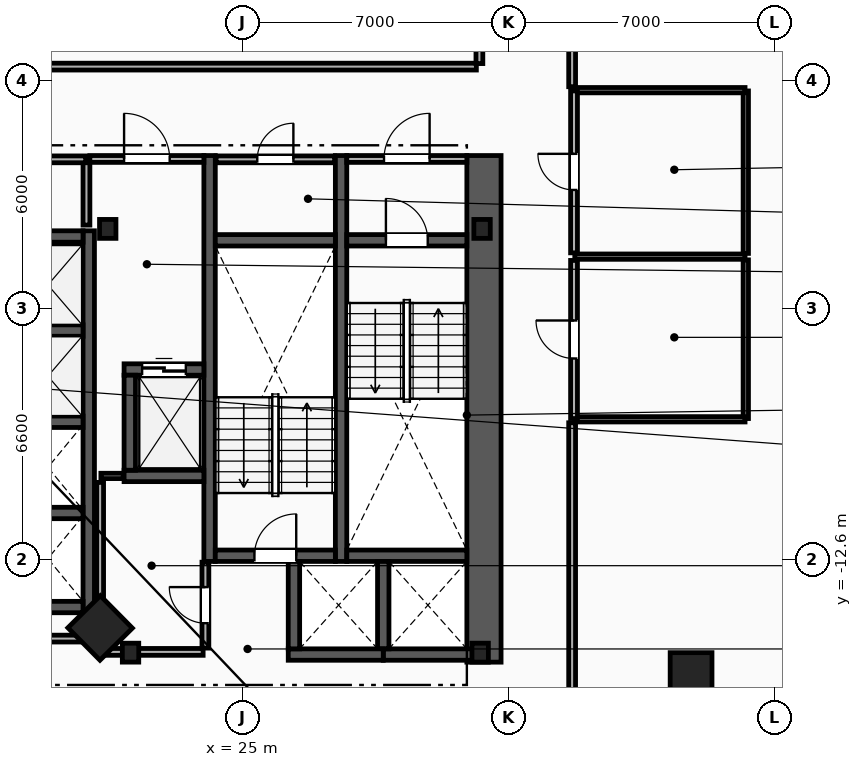
"""IFC4 building model, lengths in metres.
Left out: names, types, materials, properties, quantities, classifications, styles, units other than length and angle.
Written with IfcOpenShell. Run it as: python <this file> out.ifc"""

import sys

from ifc_helpers import new_model, si_unit, direction, frame, frame_2d, origin, origin_2d, place, context, subcontext, project, spatial, rectangle, i_section, extrude, element, fill, save


model = new_model("IFC4")
c1 = context("Model", 3, precision=1e-05, world=origin(), true_north=direction((0.0, 1.0)))
c2 = subcontext(c1, "Body", "Model", "MODEL_VIEW")
j1 = project(units=[si_unit("LENGTHUNIT", "METRE"), si_unit("PLANEANGLEUNIT", "RADIAN")], contexts=[c1])
p1 = place(None, origin())
s1 = spatial("IfcSite", under=j1, at=p1, CompositionType="ELEMENT")
p2 = place(p1, origin())
s2 = spatial("IfcBuilding", under=s1, at=p2, CompositionType="ELEMENT")
p3 = place(p2, frame((0.0, 0.0, 73.4)))
s3 = spatial("IfcBuildingStorey", under=s2, at=p3, CompositionType="ELEMENT", Elevation=73.4)
for number, where, z_axis, x_axis in (
    (1, (31.3, -3.9, 0.0), (0.0, 0.0, 1.0), (1.0, 0.0, 0.0)),
    (2, (21.45, -3.9, 0.0), (0.0, 0.0, 1.0), (1.0, 0.0, 0.0)),
    (3, (22.05, -15.05, 0.0), (0.0, 0.0, 1.0), (1.0, 0.0, 0.0)),
    (4, (31.25, -15.05, 0.0), (0.0, 0.0, 1.0), (1.0, 0.0, 0.0)),
):
    element("IfcColumn", number, at=place(p3, frame(where, z_axis=z_axis, x_axis=x_axis)), inside=s3, PredefinedType="COLUMN", context=c2, shape_type="SweptSolid", body=[
        extrude(i_section(OverallWidth=0.432, OverallDepth=0.498, WebThickness=0.056, FlangeThickness=0.089, FilletRadius=0.018, at=origin_2d()), origin(), (0.0, 0.0, 1.0), 3.8),
    ])
p4 = place(p3, frame((36.8, -15.6, 0.0), z_axis=(0.0, 0.0, 1.0), x_axis=(1.0, 0.0, 0.0)))
e5 = element("IfcColumn", 5, at=p4, inside=s3, PredefinedType="COLUMN", context=c2, shape_type="SweptSolid", body=[
    extrude(rectangle(XDim=1.1, YDim=1.1, at=origin_2d()), origin(), (0.0, 0.0, 1.0), 3.8),
])
p5 = place(p3, frame((21.25, -14.4, 0.0), z_axis=(0.0, 0.0, 1.0), x_axis=(0.703270634186, -0.710922228581, 0.0)))
e6 = element("IfcColumn", 6, at=p5, inside=s3, PredefinedType="COLUMN", context=c2, shape_type="SweptSolid", body=[
    extrude(rectangle(XDim=1.2, YDim=1.2, at=origin_2d()), origin(), (0.0, 0.0, 1.0), 3.8),
])
p6 = place(p3, frame((31.35, -15.3, 0.0), z_axis=(0.0, 0.0, 1.0), x_axis=(0.0, 1.0, 0.0)))
e7 = element("IfcWall", 7, at=p6, inside=s3, PredefinedType="SHEAR", context=c2, shape_type="SweptSolid", body=[
    extrude(rectangle(XDim=13.33, YDim=0.9, at=frame_2d((6.665, 0.0))), origin(), (0.0, 0.0, 1.0), 3.52),
])
for number, where, z_axis, x_axis in (
    (8, (27.59, -12.65, 0.0), (0.0, 0.0, 1.0), (0.0, 1.0, 0.0)),
    (9, (24.13, -12.65, 0.0), (0.0, 0.0, 1.0), (0.0, 1.0, 0.0)),
):
    element("IfcWall", number, at=place(p3, frame(where, z_axis=z_axis, x_axis=x_axis)), inside=s3, PredefinedType="SHEAR", context=c2, shape_type="SweptSolid", body=[
        extrude(rectangle(XDim=10.68, YDim=0.3, at=frame_2d((5.34, 0.0))), origin(), (0.0, 0.0, 1.0), 3.52),
    ])
p7 = place(p3, frame((27.74, -4.2, 0.0), z_axis=(0.0, 0.0, 1.0), x_axis=(1.0, 0.0, 0.0)))
e10 = element("IfcWall", 10, at=p7, inside=s3, PredefinedType="SHEAR", context=c2, shape_type="SweptSolid", body=[
    extrude(rectangle(XDim=3.16, YDim=0.3, at=frame_2d((1.58, 0.0))), origin(), (0.0, 0.0, 1.0), 3.52),
])
p8 = place(p7, frame((1.03, 0.0, 0.0)))
e11 = element("IfcOpeningElement", 11, at=p8, cuts=e10, PredefinedType="OPENING", context=c2, shape_type="SweptSolid", body=[
    extrude(rectangle(XDim=1.1, YDim=2.15, at=frame_2d((0.55, 1.075))), frame((0.0, 0.16, 0.0), z_axis=(0.0, -1.0, 0.0), x_axis=(1.0, 0.0, 0.0)), (0.0, 0.0, 1.0), 0.32),
])
p9 = place(p3, frame((27.74, -12.5, 0.0), z_axis=(0.0, 0.0, 1.0), x_axis=(1.0, 0.0, 0.0)))
e12 = element("IfcWall", 12, at=p9, inside=s3, PredefinedType="SHEAR", context=c2, shape_type="SweptSolid", body=[
    extrude(rectangle(XDim=3.16, YDim=0.3, at=frame_2d((1.58, 0.0))), origin(), (0.0, 0.0, 1.0), 3.52),
])
p10 = place(p3, frame((24.28, -12.5, 0.0), z_axis=(0.0, 0.0, 1.0), x_axis=(1.0, 0.0, 0.0)))
e13 = element("IfcWall", 13, at=p10, inside=s3, PredefinedType="SHEAR", context=c2, shape_type="SweptSolid", body=[
    extrude(rectangle(XDim=3.16, YDim=0.3, at=frame_2d((1.58, 0.0))), origin(), (0.0, 0.0, 1.0), 3.52),
])
p11 = place(p10, frame((1.03, 0.0, 0.0)))
e14 = element("IfcOpeningElement", 14, at=p11, cuts=e13, PredefinedType="OPENING", context=c2, shape_type="SweptSolid", body=[
    extrude(rectangle(XDim=1.1, YDim=2.15, at=frame_2d((0.55, 1.075))), frame((0.0, 0.16, 0.0), z_axis=(0.0, -1.0, 0.0), x_axis=(1.0, 0.0, 0.0)), (0.0, 0.0, 1.0), 0.32),
])
p12 = place(p3, frame((24.28, -4.2, 0.0), z_axis=(0.0, 0.0, 1.0), x_axis=(1.0, 0.0, 0.0)))
e15 = element("IfcWall", 15, at=p12, inside=s3, PredefinedType="SHEAR", context=c2, shape_type="SweptSolid", body=[
    extrude(rectangle(XDim=3.16, YDim=0.3, at=frame_2d((1.58, 0.0))), origin(), (0.0, 0.0, 1.0), 3.52),
])
p13 = place(p3, frame((20.89, -3.8, 0.0), z_axis=(0.0, 0.0, 1.0), x_axis=(0.0, 1.0, 0.0)))
e16 = element("IfcWall", 16, at=p13, inside=s3, PredefinedType="PARTITIONING", context=c2, shape_type="SweptSolid", body=[
    extrude(rectangle(XDim=1.65, YDim=0.18, at=frame_2d((0.825, 0.0))), origin(), (0.0, 0.0, 1.0), 3.52),
])
p14 = place(p3, frame((20.98, -2.06, 0.0), z_axis=(0.0, 0.0, 1.0), x_axis=(1.0, 0.0, 0.0)))
e17 = element("IfcWall", 17, at=p14, inside=s3, PredefinedType="PARTITIONING", context=c2, shape_type="SweptSolid", body=[
    extrude(rectangle(XDim=3.0, YDim=0.18, at=frame_2d((1.5, 0.0))), origin(), (0.0, 0.0, 1.0), 3.52),
])
p15 = place(p14, frame((0.9, 0.0, 0.0)))
e18 = element("IfcOpeningElement", 18, at=p15, cuts=e17, PredefinedType="OPENING", context=c2, shape_type="SweptSolid", body=[
    extrude(rectangle(XDim=1.2, YDim=2.15, at=frame_2d((0.6, 1.075))), frame((0.0, 0.1, 0.0), z_axis=(0.0, -1.0, 0.0), x_axis=(1.0, 0.0, 0.0)), (0.0, 0.0, 1.0), 0.2),
])
p16 = place(p3, frame((27.74, -2.06, 0.0), z_axis=(0.0, 0.0, 1.0), x_axis=(1.0, 0.0, 0.0)))
e19 = element("IfcWall", 19, at=p16, inside=s3, PredefinedType="PARTITIONING", context=c2, shape_type="SweptSolid", body=[
    extrude(rectangle(XDim=3.16, YDim=0.18, at=frame_2d((1.58, 0.0))), origin(), (0.0, 0.0, 1.0), 3.52),
])
p17 = place(p16, frame((0.98, 0.0, 0.0)))
e20 = element("IfcOpeningElement", 20, at=p17, cuts=e19, PredefinedType="OPENING", context=c2, shape_type="SweptSolid", body=[
    extrude(rectangle(XDim=1.2, YDim=2.15, at=frame_2d((0.6, 1.075))), frame((0.0, 0.1, 0.0), z_axis=(0.0, -1.0, 0.0), x_axis=(1.0, 0.0, 0.0)), (0.0, 0.0, 1.0), 0.2),
])
p18 = place(p3, frame((21.88, -7.6, 0.0), z_axis=(0.0, 0.0, 1.0), x_axis=(1.0, 0.0, 0.0)))
e21 = element("IfcWall", 21, at=p18, inside=s3, PredefinedType="SHEAR", context=c2, shape_type="SweptSolid", body=[
    extrude(rectangle(XDim=2.1, YDim=0.3, at=frame_2d((1.05, 0.0))), origin(), (0.0, 0.0, 1.0), 3.52),
])
p19 = place(p18, frame((0.475, 0.0, 0.0)))
e22 = element("IfcOpeningElement", 22, at=p19, cuts=e21, PredefinedType="OPENING", context=c2, shape_type="SweptSolid", body=[
    extrude(rectangle(XDim=1.15, YDim=2.2, at=frame_2d((0.575, 1.1))), frame((0.0, 0.16, 0.0), z_axis=(0.0, -1.0, 0.0), x_axis=(1.0, 0.0, 0.0)), (0.0, 0.0, 1.0), 0.32),
])
p20 = place(p3, frame((21.88, -10.4, 0.0), z_axis=(0.0, 0.0, 1.0), x_axis=(1.0, 0.0, 0.0)))
e23 = element("IfcWall", 23, at=p20, inside=s3, PredefinedType="SHEAR", context=c2, shape_type="SweptSolid", body=[
    extrude(rectangle(XDim=2.1, YDim=0.3, at=frame_2d((1.05, 0.0))), origin(), (0.0, 0.0, 1.0), 3.52),
])
for number, where, z_axis, x_axis in (
    (24, (22.03, -10.25, 0.0), (0.0, 0.0, 1.0), (0.0, 1.0, 0.0)),
    (25, (28.7, -15.1, 0.0), (0.0, 0.0, 1.0), (1.0, 0.0, 0.0)),
):
    element("IfcWall", number, at=place(p3, frame(where, z_axis=z_axis, x_axis=x_axis)), inside=s3, PredefinedType="SHEAR", context=c2, shape_type="SweptSolid", body=[
        extrude(rectangle(XDim=2.5, YDim=0.3, at=frame_2d((1.25, 0.0))), origin(), (0.0, 0.0, 1.0), 3.52),
    ])
p21 = place(p3, frame((28.7, -14.95, 0.0), z_axis=(0.0, 0.0, 1.0), x_axis=(0.0, 1.0, 0.0)))
e26 = element("IfcWall", 26, at=p21, inside=s3, PredefinedType="SHEAR", context=c2, shape_type="SweptSolid", body=[
    extrude(rectangle(XDim=2.3, YDim=0.3, at=frame_2d((1.15, 0.0))), origin(), (0.0, 0.0, 1.0), 3.52),
])
p22 = place(p3, frame((26.2, -15.1, 0.0), z_axis=(0.0, 0.0, 1.0), x_axis=(1.0, 0.0, 0.0)))
e27 = element("IfcWall", 27, at=p22, inside=s3, PredefinedType="SHEAR", context=c2, shape_type="SweptSolid", body=[
    extrude(rectangle(XDim=2.5, YDim=0.3, at=frame_2d((1.25, 0.0))), origin(), (0.0, 0.0, 1.0), 3.52),
])
p23 = place(p3, frame((26.35, -14.95, 0.0), z_axis=(0.0, 0.0, 1.0), x_axis=(0.0, 1.0, 0.0)))
e28 = element("IfcWall", 28, at=p23, inside=s3, PredefinedType="SHEAR", context=c2, shape_type="SweptSolid", body=[
    extrude(rectangle(XDim=2.3, YDim=0.3, at=frame_2d((1.15, 0.0))), origin(), (0.0, 0.0, 1.0), 3.52),
])
p24 = place(p3, frame((20.95, -14.0, 0.0), z_axis=(0.0, 0.0, 1.0), x_axis=(0.0, 1.0, 0.0)))
e29 = element("IfcWall", 29, at=p24, inside=s3, PredefinedType="SHEAR", context=c2, shape_type="SweptSolid", body=[
    extrude(rectangle(XDim=10.05, YDim=0.3, at=frame_2d((5.025, 0.0))), origin(), (0.0, 0.0, 1.0), 3.52),
])
p25 = place(p3, frame((18.95, -13.85, 0.0), z_axis=(0.0, 0.0, 1.0), x_axis=(1.0, 0.0, 0.0)))
e30 = element("IfcWall", 30, at=p25, inside=s3, PredefinedType="SHEAR", context=c2, shape_type="SweptSolid", body=[
    extrude(rectangle(XDim=1.85, YDim=0.3, at=frame_2d((0.925, 0.0))), origin(), (0.0, 0.0, 1.0), 3.52),
])
p26 = place(p3, frame((18.65, -4.1, 0.0), z_axis=(0.0, 0.0, 1.0), x_axis=(1.0, 0.0, 0.0)))
e31 = element("IfcWall", 31, at=p26, inside=s3, PredefinedType="SHEAR", context=c2, shape_type="SweptSolid", body=[
    extrude(rectangle(XDim=2.15, YDim=0.3, at=frame_2d((1.075, 0.0))), origin(), (0.0, 0.0, 1.0), 3.52),
])
for number, where, z_axis, x_axis in (
    (32, (18.95, -11.375, 0.0), (0.0, 0.0, 1.0), (1.0, 0.0, 0.0)),
    (33, (18.95, -8.975, 0.0), (0.0, 0.0, 1.0), (1.0, 0.0, 0.0)),
    (34, (18.95, -6.575, 0.0), (0.0, 0.0, 1.0), (1.0, 0.0, 0.0)),
):
    element("IfcWall", number, at=place(p3, frame(where, z_axis=z_axis, x_axis=x_axis)), inside=s3, PredefinedType="SHEAR", context=c2, shape_type="SweptSolid", body=[
        extrude(rectangle(XDim=1.85, YDim=0.3, at=frame_2d((0.925, 0.0))), origin(), (0.0, 0.0, 1.0), 3.52),
    ])
p27 = place(p3, frame((17.12, -2.07, 0.0), z_axis=(0.0, 0.0, 1.0), x_axis=(1.0, 0.0, 0.0)))
e35 = element("IfcWall", 35, at=p27, inside=s3, PredefinedType="PARTITIONING", context=c2, shape_type="SweptSolid", body=[
    extrude(rectangle(XDim=3.75, YDim=0.18, at=frame_2d((1.875, 0.0))), origin(), (0.0, 0.0, 1.0), 3.52),
])
p28 = place(p27, frame((1.4, 0.0, 0.0)))
e36 = element("IfcOpeningElement", 36, at=p28, cuts=e35, PredefinedType="OPENING", context=c2, shape_type="SweptSolid", body=[
    extrude(rectangle(XDim=0.95, YDim=2.1, at=frame_2d((0.475, 1.05))), frame((0.0, 0.1, 0.0), z_axis=(0.0, -1.0, 0.0), x_axis=(1.0, 0.0, 0.0)), (0.0, 0.0, 1.0), 0.2),
])
p29 = place(p3, frame((21.27, -10.4, 0.0), z_axis=(0.0, 0.0, 1.0), x_axis=(1.0, 0.0, 0.0)))
e37 = element("IfcWall", 37, at=p29, inside=s3, PredefinedType="PARTITIONING", context=c2, shape_type="SweptSolid", body=[
    extrude(rectangle(XDim=0.59, YDim=0.14, at=frame_2d((0.295, 0.0))), origin(), (0.0, 0.0, 1.0), 3.52),
])
p30 = place(p3, frame((21.25, -14.93, 0.0), z_axis=(0.0, 0.0, 1.0), x_axis=(0.0, 1.0, 0.0)))
e38 = element("IfcWall", 38, at=p30, inside=s3, PredefinedType="PARTITIONING", context=c2, shape_type="SweptSolid", body=[
    extrude(rectangle(XDim=4.36, YDim=0.18, at=frame_2d((2.18, 0.0))), origin(), (0.0, 0.0, 1.0), 3.52),
])
p31 = place(p3, frame((21.35, -15.03, 0.0), z_axis=(0.0, 0.0, 1.0), x_axis=(1.0, 0.0, 0.0)))
e39 = element("IfcWall", 39, at=p31, inside=s3, PredefinedType="PARTITIONING", context=c2, shape_type="SweptSolid", body=[
    extrude(rectangle(XDim=2.61, YDim=0.18, at=frame_2d((1.305, 0.0))), origin(), (0.0, 0.0, 1.0), 2.593),
])
p32 = place(p3, frame((24.3, -2.07, 0.0), z_axis=(0.0, 0.0, 1.0), x_axis=(1.0, 0.0, 0.0)))
e40 = element("IfcWall", 40, at=p32, inside=s3, PredefinedType="PARTITIONING", context=c2, shape_type="SweptSolid", body=[
    extrude(rectangle(XDim=3.12, YDim=0.18, at=frame_2d((1.56, 0.0))), origin(), (0.0, 0.0, 1.0), 3.52),
])
p33 = place(p32, frame((1.085, 0.0, 0.0)))
e41 = element("IfcOpeningElement", 41, at=p33, cuts=e40, PredefinedType="OPENING", context=c2, shape_type="SweptSolid", body=[
    extrude(rectangle(XDim=0.95, YDim=2.1, at=frame_2d((0.475, 1.05))), frame((0.0, 0.1, 0.0), z_axis=(0.0, -1.0, 0.0), x_axis=(1.0, 0.0, 0.0)), (0.0, 0.0, 1.0), 0.2),
])
p34 = place(p3, frame((24.02, -14.93, 0.0), z_axis=(0.0, 0.0, 1.0), x_axis=(0.0, 1.0, 0.0)))
e42 = element("IfcWall", 42, at=p34, inside=s3, PredefinedType="PARTITIONING", context=c2, shape_type="SweptSolid", body=[
    extrude(rectangle(XDim=2.26, YDim=0.18, at=frame_2d((1.13, 0.0))), origin(), (0.0, 0.0, 1.0), 3.52),
])
p35 = place(p34, frame((0.655, 0.0, 0.0)))
e43 = element("IfcOpeningElement", 43, at=p35, cuts=e42, PredefinedType="OPENING", context=c2, shape_type="SweptSolid", body=[
    extrude(rectangle(XDim=0.95, YDim=2.1, at=frame_2d((0.475, 1.05))), frame((0.0, 0.1, 0.0), z_axis=(0.0, -1.0, 0.0), x_axis=(1.0, 0.0, 0.0)), (0.0, 0.0, 1.0), 0.2),
])
p36 = place(p3, frame((38.24, -8.89, 0.0), z_axis=(0.0, 0.0, 1.0), x_axis=(0.0, 1.0, 0.0)))
e44 = element("IfcWall", 44, at=p36, inside=s3, PredefinedType="PARTITIONING", context=c2, shape_type="SweptSolid", body=[
    extrude(rectangle(XDim=4.175, YDim=0.14, at=frame_2d((2.087, 0.0))), origin(), (0.0, 0.0, 1.0), 3.52),
])
p37 = place(p3, frame((38.24, -4.545, 0.0), z_axis=(0.0, 0.0, 1.0), x_axis=(0.0, 1.0, 0.0)))
e45 = element("IfcWall", 45, at=p37, inside=s3, PredefinedType="PARTITIONING", context=c2, shape_type="SweptSolid", body=[
    extrude(rectangle(XDim=4.275, YDim=0.14, at=frame_2d((2.137, 0.0))), origin(), (0.0, 0.0, 1.0), 3.52),
])
for number, where, z_axis, x_axis in (
    (46, (33.74, -0.25, 0.0), (0.0, 0.0, 1.0), (1.0, 0.0, 0.0)),
    (47, (33.74, -4.63, 0.0), (0.0, 0.0, 1.0), (1.0, 0.0, 0.0)),
    (48, (33.74, -8.91, 0.0), (0.0, 0.0, 1.0), (1.0, 0.0, 0.0)),
):
    element("IfcWall", number, at=place(p3, frame(where, z_axis=z_axis, x_axis=x_axis)), inside=s3, PredefinedType="PARTITIONING", context=c2, shape_type="SweptSolid", body=[
        extrude(rectangle(XDim=4.48, YDim=0.14, at=frame_2d((2.24, 0.0))), origin(), (0.0, 0.0, 1.0), 3.52),
    ])
p38 = place(p3, frame((33.72, -4.53, 0.0), z_axis=(0.0, 0.0, 1.0), x_axis=(0.0, 1.0, 0.0)))
e49 = element("IfcWall", 49, at=p38, inside=s3, PredefinedType="PARTITIONING", context=c2, shape_type="SweptSolid", body=[
    extrude(rectangle(XDim=4.26, YDim=0.18, at=frame_2d((2.13, 0.0))), origin(), (0.0, 0.0, 1.0), 3.52),
])
p39 = place(p38, frame((1.655, 0.0, 0.0)))
e50 = element("IfcOpeningElement", 50, at=p39, cuts=e49, PredefinedType="OPENING", context=c2, shape_type="SweptSolid", body=[
    extrude(rectangle(XDim=0.95, YDim=2.1, at=frame_2d((0.475, 1.05))), frame((0.0, 0.1, 0.0), z_axis=(0.0, -1.0, 0.0), x_axis=(1.0, 0.0, 0.0)), (0.0, 0.0, 1.0), 0.2),
])
p40 = place(p3, frame((33.72, -8.89, 0.0), z_axis=(0.0, 0.0, 1.0), x_axis=(0.0, 1.0, 0.0)))
e51 = element("IfcWall", 51, at=p40, inside=s3, PredefinedType="PARTITIONING", context=c2, shape_type="SweptSolid", body=[
    extrude(rectangle(XDim=4.16, YDim=0.18, at=frame_2d((2.08, 0.0))), origin(), (0.0, 0.0, 1.0), 3.52),
])
p41 = place(p40, frame((1.58, 0.0, 0.0)))
e52 = element("IfcOpeningElement", 52, at=p41, cuts=e51, PredefinedType="OPENING", context=c2, shape_type="SweptSolid", body=[
    extrude(rectangle(XDim=1.0, YDim=2.15, at=frame_2d((0.5, 1.075))), frame((0.0, 0.1, 0.0), z_axis=(0.0, -1.0, 0.0), x_axis=(1.0, 0.0, 0.0)), (0.0, 0.0, 1.0), 0.2),
])
p42 = place(p3, frame((31.15, 0.37, 0.0), z_axis=(0.0, 0.0, 1.0), x_axis=(-1.0, 0.0, 0.0)))
e53 = element("IfcWall", 53, at=p42, inside=s3, PredefinedType="PARTITIONING", context=c2, shape_type="SweptSolid", body=[
    extrude(rectangle(XDim=14.328, YDim=0.18, at=frame_2d((7.164, 0.0))), origin(), (0.0, 0.0, 1.0), 3.52),
])
p43 = place(p3, frame((33.67, -0.159, 0.0), z_axis=(0.0, 0.0, 1.0), x_axis=(0.0, 1.0, 0.0)))
e54 = element("IfcWall", 54, at=p43, inside=s3, PredefinedType="PARTITIONING", context=c2, shape_type="SweptSolid", body=[
    extrude(rectangle(XDim=11.559, YDim=0.18, at=frame_2d((5.779, 0.0))), origin(), (0.0, 0.0, 1.0), 3.52),
])
p44 = place(p3, frame((31.23, 11.4, 0.0), z_axis=(0.0, 0.0, 1.0), x_axis=(0.0, -1.0, 0.0)))
e55 = element("IfcWall", 55, at=p44, inside=s3, PredefinedType="PARTITIONING", context=c2, shape_type="SweptSolid", body=[
    extrude(rectangle(XDim=10.95, YDim=0.18, at=frame_2d((5.475, 0.0))), origin(), (0.0, 0.0, 1.0), 3.52),
])
p45 = place(p3, frame((33.67, -17.428, 0.0), z_axis=(0.0, 0.0, 1.0), x_axis=(0.0, 1.0, 0.0)))
e56 = element("IfcWall", 56, at=p45, inside=s3, PredefinedType="PARTITIONING", context=c2, shape_type="SweptSolid", body=[
    extrude(rectangle(XDim=8.427, YDim=0.18, at=frame_2d((4.213, 0.0))), origin(), (0.0, 0.0, 1.0), 3.52),
])
p46 = place(p3, frame((21.178, -14.68, 0.0), z_axis=(0.0, 0.0, 1.0), x_axis=(-1.0, 0.0, 0.0)))
e57 = element("IfcWall", 57, at=p46, inside=s3, PredefinedType="PARTITIONING", context=c2, shape_type="SweptSolid", body=[
    extrude(rectangle(XDim=4.357, YDim=0.18, at=frame_2d((2.178, 0.0))), origin(), (0.0, 0.0, 1.0), 3.52),
])
p47 = place(p8, origin())
e58 = element("IfcDoor", 58, at=p47, inside=s3, OperationType="SINGLE_SWING_LEFT", PredefinedType="DOOR", context=c2, shape_type="SweptSolid", body=[
    extrude(rectangle(XDim=1.1, YDim=2.15, at=frame_2d((0.55, 1.075))), frame((0.0, 0.025, 0.0), z_axis=(0.0, -1.0, 0.0), x_axis=(1.0, 0.0, 0.0)), (0.0, 0.0, 1.0), 0.05),
])
fill(e11, e58)
p48 = place(p11, origin())
e59 = element("IfcDoor", 59, at=p48, inside=s3, OperationType="SINGLE_SWING_RIGHT", PredefinedType="DOOR", context=c2, shape_type="SweptSolid", body=[
    extrude(rectangle(XDim=1.1, YDim=2.15, at=frame_2d((0.55, 1.075))), frame((0.0, 0.025, 0.0), z_axis=(0.0, -1.0, 0.0), x_axis=(1.0, 0.0, 0.0)), (0.0, 0.0, 1.0), 0.05),
])
fill(e14, e59)
p49 = place(p15, origin())
e60 = element("IfcDoor", 60, at=p49, inside=s3, OperationType="SINGLE_SWING_LEFT", PredefinedType="DOOR", context=c2, shape_type="SweptSolid", body=[
    extrude(rectangle(XDim=1.2, YDim=2.15, at=frame_2d((0.6, 1.075))), frame((0.0, 0.025, 0.0), z_axis=(0.0, -1.0, 0.0), x_axis=(1.0, 0.0, 0.0)), (0.0, 0.0, 1.0), 0.05),
])
fill(e18, e60)
p50 = place(p17, origin())
e61 = element("IfcDoor", 61, at=p50, inside=s3, OperationType="SINGLE_SWING_RIGHT", PredefinedType="DOOR", context=c2, shape_type="SweptSolid", body=[
    extrude(rectangle(XDim=1.2, YDim=2.15, at=frame_2d((0.6, 1.075))), frame((0.0, 0.025, 0.0), z_axis=(0.0, -1.0, 0.0), x_axis=(1.0, 0.0, 0.0)), (0.0, 0.0, 1.0), 0.05),
])
fill(e20, e61)
p51 = place(p19, origin())
e62 = element("IfcDoor", 62, at=p51, inside=s3, OperationType="SLIDING_TO_LEFT", PredefinedType="TRAPDOOR", context=c2, shape_type="SweptSolid", body=[
    extrude(rectangle(XDim=1.15, YDim=2.2, at=frame_2d((0.575, 1.1))), frame((0.0, 0.025, 0.0), z_axis=(0.0, -1.0, 0.0), x_axis=(1.0, 0.0, 0.0)), (0.0, 0.0, 1.0), 0.05),
])
fill(e22, e62)
p52 = place(p39, origin())
e63 = element("IfcDoor", 63, at=p52, inside=s3, OperationType="SINGLE_SWING_RIGHT", PredefinedType="DOOR", context=c2, shape_type="SweptSolid", body=[
    extrude(rectangle(XDim=0.95, YDim=2.1, at=frame_2d((0.475, 1.05))), frame((0.0, 0.025, 0.0), z_axis=(0.0, -1.0, 0.0), x_axis=(1.0, 0.0, 0.0)), (0.0, 0.0, 1.0), 0.05),
])
fill(e50, e63)
p53 = place(p41, origin())
e64 = element("IfcDoor", 64, at=p53, inside=s3, OperationType="SINGLE_SWING_RIGHT", PredefinedType="DOOR", context=c2, shape_type="SweptSolid", body=[
    extrude(rectangle(XDim=1.0, YDim=2.15, at=frame_2d((0.5, 1.075))), frame((0.0, 0.025, 0.0), z_axis=(0.0, -1.0, 0.0), x_axis=(1.0, 0.0, 0.0)), (0.0, 0.0, 1.0), 0.05),
])
fill(e52, e64)
p54 = place(p33, origin())
e65 = element("IfcDoor", 65, at=p54, inside=s3, OperationType="SINGLE_SWING_RIGHT", PredefinedType="DOOR", context=c2, shape_type="SweptSolid", body=[
    extrude(rectangle(XDim=0.95, YDim=2.1, at=frame_2d((0.475, 1.05))), frame((0.0, 0.025, 0.0), z_axis=(0.0, -1.0, 0.0), x_axis=(1.0, 0.0, 0.0)), (0.0, 0.0, 1.0), 0.05),
])
fill(e41, e65)
p55 = place(p35, origin())
e66 = element("IfcDoor", 66, at=p55, inside=s3, OperationType="SINGLE_SWING_RIGHT", PredefinedType="DOOR", context=c2, shape_type="SweptSolid", body=[
    extrude(rectangle(XDim=0.95, YDim=2.1, at=frame_2d((0.475, 1.05))), frame((0.0, 0.025, 0.0), z_axis=(0.0, -1.0, 0.0), x_axis=(1.0, 0.0, 0.0)), (0.0, 0.0, 1.0), 0.05),
])
fill(e43, e66)
save(model, sys.argv[1])
